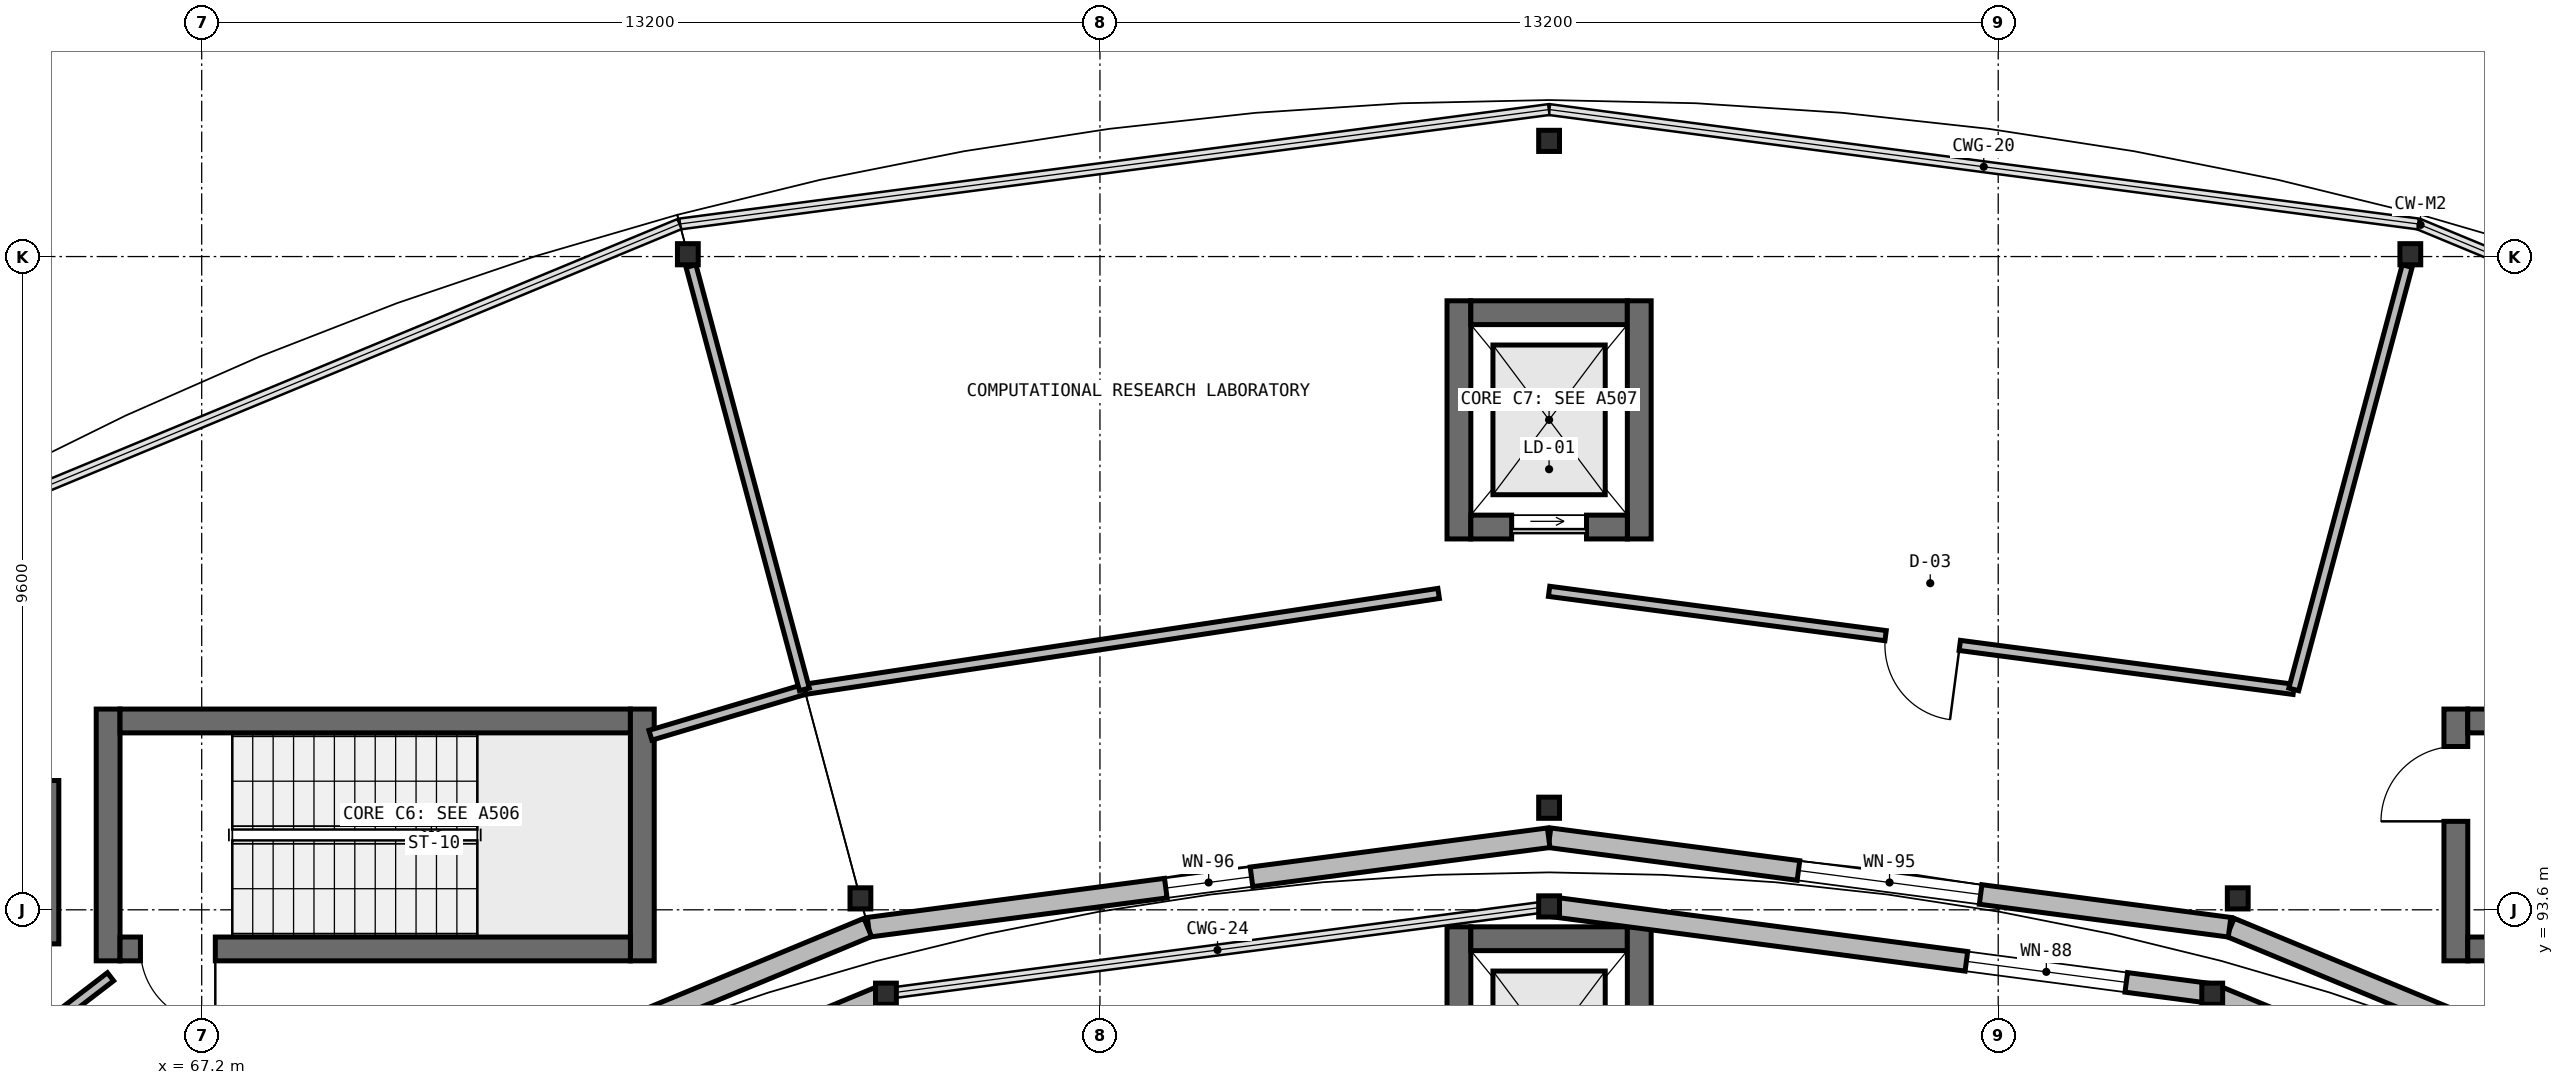
"""IFC4 building model, lengths in metres.
Left out: names, types, materials, properties, quantities, classifications, styles, units other than length and angle.
Written with IfcOpenShell. Run it as: python <this file> out.ifc"""

import sys

from ifc_helpers import new_model, si_unit, direction, frame, frame_2d, origin, origin_2d, place, context, subcontext, project, spatial, rectangle, i_section, extrude, element, fill, save


model = new_model("IFC4")
c1 = context("Model", 3, precision=1e-05, world=origin(), true_north=direction((0.0, 1.0)))
c2 = subcontext(c1, "Body", "Model", "MODEL_VIEW")
j1 = project(units=[si_unit("LENGTHUNIT", "METRE"), si_unit("PLANEANGLEUNIT", "RADIAN")], contexts=[c1])
p1 = place(None, origin())
s1 = spatial("IfcSite", under=j1, at=p1, CompositionType="ELEMENT")
p2 = place(p1, origin())
s2 = spatial("IfcBuilding", under=s1, at=p2, CompositionType="ELEMENT")
p3 = place(p2, frame((0.0, 0.0, 14.35)))
s3 = spatial("IfcBuildingStorey", under=s2, at=p3, CompositionType="ELEMENT", Elevation=14.35)
p4 = place(p3, frame((100.325, 92.85, 0.0), z_axis=(0.0, 0.0, 1.0), x_axis=(0.0, 1.0, 0.0)))
e1 = element("IfcWall", 1, at=p4, inside=s3, PredefinedType="SHEAR", context=c2, shape_type="SweptSolid", body=[
    extrude(rectangle(XDim=3.7, YDim=0.35, at=frame_2d((1.85, 0.0))), origin(), (0.0, 0.0, 1.0), 4.55),
])
p5 = place(p4, frame((2.05, 0.0, 0.0)))
e2 = element("IfcOpeningElement", 2, at=p5, cuts=e1, PredefinedType="OPENING", context=c2, shape_type="SweptSolid", body=[
    extrude(rectangle(XDim=1.1, YDim=2.15, at=frame_2d((0.55, 1.075))), frame((0.0, 0.185, 0.0), z_axis=(0.0, -1.0, 0.0), x_axis=(1.0, 0.0, 0.0)), (0.0, 0.0, 1.0), 0.37),
])
for number, where, z_axis, x_axis in (
    (3, (100.5, 96.375, 0.0), (0.0, 0.0, 1.0), (1.0, 0.0, 0.0)),
    (4, (108.0, 93.025, 0.0), (0.0, 0.0, 1.0), (-1.0, 0.0, 0.0)),
):
    element("IfcWall", number, at=place(p3, frame(where, z_axis=z_axis, x_axis=x_axis)), inside=s3, PredefinedType="SHEAR", context=c2, shape_type="SweptSolid", body=[
        extrude(rectangle(XDim=7.5, YDim=0.35, at=frame_2d((3.75, 0.0))), origin(), (0.0, 0.0, 1.0), 4.55),
    ])
p6 = place(p3, frame((65.825, 92.85, 0.0), z_axis=(0.0, 0.0, 1.0), x_axis=(0.0, 1.0, 0.0)))
e5 = element("IfcWall", 5, at=p6, inside=s3, PredefinedType="SHEAR", context=c2, shape_type="SweptSolid", body=[
    extrude(rectangle(XDim=3.7, YDim=0.35, at=frame_2d((1.85, 0.0))), origin(), (0.0, 0.0, 1.0), 4.55),
])
p7 = place(p3, frame((66.0, 96.375, 0.0), z_axis=(0.0, 0.0, 1.0), x_axis=(1.0, 0.0, 0.0)))
e6 = element("IfcWall", 6, at=p7, inside=s3, PredefinedType="SHEAR", context=c2, shape_type="SweptSolid", body=[
    extrude(rectangle(XDim=7.5, YDim=0.35, at=frame_2d((3.75, 0.0))), origin(), (0.0, 0.0, 1.0), 4.55),
])
p8 = place(p3, frame((73.675, 96.55, 0.0), z_axis=(0.0, 0.0, 1.0), x_axis=(0.0, -1.0, 0.0)))
e7 = element("IfcWall", 7, at=p8, inside=s3, PredefinedType="SHEAR", context=c2, shape_type="SweptSolid", body=[
    extrude(rectangle(XDim=3.7, YDim=0.35, at=frame_2d((1.85, 0.0))), origin(), (0.0, 0.0, 1.0), 4.55),
])
p9 = place(p3, frame((73.5, 93.025, 0.0), z_axis=(0.0, 0.0, 1.0), x_axis=(-1.0, 0.0, 0.0)))
e8 = element("IfcWall", 8, at=p9, inside=s3, PredefinedType="SHEAR", context=c2, shape_type="SweptSolid", body=[
    extrude(rectangle(XDim=7.5, YDim=0.35, at=frame_2d((3.75, 0.0))), origin(), (0.0, 0.0, 1.0), 4.55),
])
p10 = place(p9, frame((6.1, 0.0, 0.0)))
e9 = element("IfcOpeningElement", 9, at=p10, cuts=e8, PredefinedType="OPENING", context=c2, shape_type="SweptSolid", body=[
    extrude(rectangle(XDim=1.1, YDim=2.15, at=frame_2d((0.55, 1.075))), frame((0.0, 0.185, 0.0), z_axis=(0.0, -1.0, 0.0), x_axis=(1.0, 0.0, 0.0)), (0.0, 0.0, 1.0), 0.37),
])
p11 = place(p3, frame((85.675, 89.85, 0.0), z_axis=(0.0, 0.0, 1.0), x_axis=(0.0, 1.0, 0.0)))
e10 = element("IfcWall", 10, at=p11, inside=s3, PredefinedType="SHEAR", context=c2, shape_type="SweptSolid", body=[
    extrude(rectangle(XDim=3.5, YDim=0.35, at=frame_2d((1.75, 0.0))), origin(), (0.0, 0.0, 1.0), 4.55),
])
p12 = place(p3, frame((85.85, 93.175, 0.0), z_axis=(0.0, 0.0, 1.0), x_axis=(1.0, 0.0, 0.0)))
e11 = element("IfcWall", 11, at=p12, inside=s3, PredefinedType="SHEAR", context=c2, shape_type="SweptSolid", body=[
    extrude(rectangle(XDim=2.3, YDim=0.35, at=frame_2d((1.15, 0.0))), origin(), (0.0, 0.0, 1.0), 4.55),
])
for number, where, z_axis, x_axis in (
    (12, (88.325, 93.35, 0.0), (0.0, 0.0, 1.0), (0.0, -1.0, 0.0)),
    (13, (85.675, 99.05, 0.0), (0.0, 0.0, 1.0), (0.0, 1.0, 0.0)),
):
    element("IfcWall", number, at=place(p3, frame(where, z_axis=z_axis, x_axis=x_axis)), inside=s3, PredefinedType="SHEAR", context=c2, shape_type="SweptSolid", body=[
        extrude(rectangle(XDim=3.5, YDim=0.35, at=frame_2d((1.75, 0.0))), origin(), (0.0, 0.0, 1.0), 4.55),
    ])
p13 = place(p3, frame((85.85, 102.375, 0.0), z_axis=(0.0, 0.0, 1.0), x_axis=(1.0, 0.0, 0.0)))
e14 = element("IfcWall", 14, at=p13, inside=s3, PredefinedType="SHEAR", context=c2, shape_type="SweptSolid", body=[
    extrude(rectangle(XDim=2.3, YDim=0.35, at=frame_2d((1.15, 0.0))), origin(), (0.0, 0.0, 1.0), 4.55),
])
p14 = place(p3, frame((88.325, 102.55, 0.0), z_axis=(0.0, 0.0, 1.0), x_axis=(0.0, -1.0, 0.0)))
e15 = element("IfcWall", 15, at=p14, inside=s3, PredefinedType="SHEAR", context=c2, shape_type="SweptSolid", body=[
    extrude(rectangle(XDim=3.5, YDim=0.35, at=frame_2d((1.75, 0.0))), origin(), (0.0, 0.0, 1.0), 4.55),
])
p15 = place(p3, frame((88.15, 99.225, 0.0), z_axis=(0.0, 0.0, 1.0), x_axis=(-1.0, 0.0, 0.0)))
e16 = element("IfcWall", 16, at=p15, inside=s3, PredefinedType="SHEAR", context=c2, shape_type="SweptSolid", body=[
    extrude(rectangle(XDim=2.3, YDim=0.35, at=frame_2d((1.15, 0.0))), origin(), (0.0, 0.0, 1.0), 4.55),
])
p16 = place(p15, frame((0.6, 0.0, 0.0)))
e17 = element("IfcOpeningElement", 17, at=p16, cuts=e16, PredefinedType="OPENING", context=c2, shape_type="SweptSolid", body=[
    extrude(rectangle(XDim=1.1, YDim=2.15, at=frame_2d((0.55, 1.075))), frame((0.0, 0.185, 0.0), z_axis=(0.0, -1.0, 0.0), x_axis=(1.0, 0.0, 0.0)), (0.0, 0.0, 1.0), 0.37),
])
for number, where, z_axis, x_axis in (
    (18, (97.12, 93.768, 0.0), (0.0, 0.0, 1.0), (1.0, 0.0, 0.0)),
    (19, (99.656, 103.234, 0.0), (0.0, 0.0, 1.0), (1.0, 0.0, 0.0)),
    (20, (87.0, 95.1, 0.0), (0.0, 0.0, 1.0), (1.0, 0.0, 0.0)),
    (21, (87.0, 104.9, 0.0), (0.0, 0.0, 1.0), (1.0, 0.0, 0.0)),
    (22, (76.88, 93.768, 0.0), (0.0, 0.0, 1.0), (1.0, 0.0, 0.0)),
    (23, (74.344, 103.234, 0.0), (0.0, 0.0, 1.0), (1.0, 0.0, 0.0)),
    (24, (96.745, 92.367, 0.0), (0.0, 0.0, 1.0), (1.0, 0.0, 0.0)),
    (25, (87.0, 93.65, 0.0), (0.0, 0.0, 1.0), (1.0, 0.0, 0.0)),
    (26, (77.255, 92.367, 0.0), (0.0, 0.0, 1.0), (1.0, 0.0, 0.0)),
):
    element("IfcColumn", number, at=place(p3, frame(where, z_axis=z_axis, x_axis=x_axis)), inside=s3, PredefinedType="COLUMN", context=c2, shape_type="SweptSolid", body=[
        extrude(i_section(OverallWidth=0.306, OverallDepth=0.311, WebThickness=0.011, FlangeThickness=0.017, at=origin_2d()), origin(), (0.0, 0.0, 1.0), 4.55),
    ])
p17 = place(p3, frame((64.95, 95.5, 0.0), z_axis=(0.0, 0.0, 1.0), x_axis=(0.0, -1.0, 0.0)))
e27 = element("IfcWall", 27, at=p17, inside=s3, PredefinedType="SHEAR", context=c2, shape_type="SweptSolid", body=[
    extrude(rectangle(XDim=2.4, YDim=0.3, at=frame_2d((1.2, 0.0))), origin(), (0.0, 0.0, 1.0), 4.37),
])
p18 = place(p3, frame((106.325, 89.483, 0.0), z_axis=(0.0, 0.0, 1.0), x_axis=(-0.92385889973, 0.382733240508, 0.0)))
e28 = element("IfcWall", 28, at=p18, inside=s3, PredefinedType="SOLIDWALL", context=c2, shape_type="SweptSolid", body=[
    extrude(rectangle(XDim=10.081, YDim=0.29, at=frame_2d((5.04, 0.0))), origin(), (0.0, 0.0, 1.0), 4.37),
])
p19 = place(p18, frame((3.855, 0.0, 0.95)))
e29 = element("IfcOpeningElement", 29, at=p19, cuts=e28, PredefinedType="OPENING", context=c2, shape_type="SweptSolid", body=[
    extrude(rectangle(XDim=2.37, YDim=1.59, at=frame_2d((1.185, 0.795))), frame((0.0, 0.155, 0.0), z_axis=(0.0, -1.0, 0.0), x_axis=(1.0, 0.0, 0.0)), (0.0, 0.0, 1.0), 0.31),
])
p20 = place(p3, frame((97.0, 93.344, 0.0), z_axis=(0.0, 0.0, 1.0), x_axis=(-0.991454872597, 0.130450126879, 0.0)))
e30 = element("IfcWall", 30, at=p20, inside=s3, PredefinedType="SOLIDWALL", context=c2, shape_type="SweptSolid", body=[
    extrude(rectangle(XDim=10.08, YDim=0.29, at=frame_2d((5.04, 0.0))), origin(), (0.0, 0.0, 1.0), 3.734),
])
p21 = place(p20, frame((3.69, 0.0, 0.95)))
e31 = element("IfcOpeningElement", 31, at=p21, cuts=e30, PredefinedType="OPENING", context=c2, shape_type="SweptSolid", body=[
    extrude(rectangle(XDim=2.7, YDim=1.51, at=frame_2d((1.35, 0.755))), frame((0.0, 0.155, 0.0), z_axis=(0.0, -1.0, 0.0), x_axis=(1.0, 0.0, 0.0)), (0.0, 0.0, 1.0), 0.31),
])
p22 = place(p3, frame((86.994, 94.659, 0.0), z_axis=(0.0, 0.0, 1.0), x_axis=(-0.991454872597, -0.130450126879, 0.0)))
e32 = element("IfcWall", 32, at=p22, inside=s3, PredefinedType="SOLIDWALL", context=c2, shape_type="SweptSolid", body=[
    extrude(rectangle(XDim=10.08, YDim=0.29, at=frame_2d((5.04, 0.0))), origin(), (0.0, 0.0, 1.0), 3.734),
])
p23 = place(p22, frame((4.405, 0.0, 0.95)))
e33 = element("IfcOpeningElement", 33, at=p23, cuts=e32, PredefinedType="OPENING", context=c2, shape_type="SweptSolid", body=[
    extrude(rectangle(XDim=1.27, YDim=1.43, at=frame_2d((0.635, 0.715))), frame((0.0, 0.155, 0.0), z_axis=(0.0, -1.0, 0.0), x_axis=(1.0, 0.0, 0.0)), (0.0, 0.0, 1.0), 0.31),
])
p24 = place(p3, frame((76.988, 93.341, 0.0), z_axis=(0.0, 0.0, 1.0), x_axis=(-0.92385889973, -0.382733240508, 0.0)))
e34 = element("IfcWall", 34, at=p24, inside=s3, PredefinedType="SOLIDWALL", context=c2, shape_type="SweptSolid", body=[
    extrude(rectangle(XDim=10.081, YDim=0.29, at=frame_2d((5.04, 0.0))), origin(), (0.0, 0.0, 1.0), 4.37),
])
p25 = place(p24, frame((4.24, 0.0, 0.95)))
e35 = element("IfcOpeningElement", 35, at=p25, cuts=e34, PredefinedType="OPENING", context=c2, shape_type="SweptSolid", body=[
    extrude(rectangle(XDim=1.6, YDim=1.35, at=frame_2d((0.8, 0.675))), frame((0.0, 0.155, 0.0), z_axis=(0.0, -1.0, 0.0), x_axis=(1.0, 0.0, 0.0)), (0.0, 0.0, 1.0), 0.31),
])
p26 = place(p3, frame((96.748, 92.366, 0.0), z_axis=(0.0, 0.0, 1.0), x_axis=(0.923848052238, -0.382759423628, 0.0)))
e36 = element("IfcWall", 36, at=p26, inside=s3, PredefinedType="SOLIDWALL", context=c2, shape_type="SweptSolid", body=[
    extrude(rectangle(XDim=9.821, YDim=0.29, at=frame_2d((4.91, 0.0))), origin(), (0.0, 0.0, 1.0), 4.37),
])
p27 = place(p26, frame((1.6, 0.0, 0.95)))
e37 = element("IfcOpeningElement", 37, at=p27, cuts=e36, PredefinedType="OPENING", context=c2, shape_type="SweptSolid", body=[
    extrude(rectangle(XDim=1.71, YDim=1.8, at=frame_2d((0.855, 0.9))), frame((0.0, 0.155, 0.0), z_axis=(0.0, -1.0, 0.0), x_axis=(1.0, 0.0, 0.0)), (0.0, 0.0, 1.0), 0.31),
])
p28 = place(p26, frame((6.511, 0.0, 0.95)))
e38 = element("IfcOpeningElement", 38, at=p28, cuts=e36, PredefinedType="OPENING", context=c2, shape_type="SweptSolid", body=[
    extrude(rectangle(XDim=1.71, YDim=1.8, at=frame_2d((0.855, 0.9))), frame((0.0, 0.155, 0.0), z_axis=(0.0, -1.0, 0.0), x_axis=(1.0, 0.0, 0.0)), (0.0, 0.0, 1.0), 0.31),
])
p29 = place(p3, frame((87.004, 93.649, 0.0), z_axis=(0.0, 0.0, 1.0), x_axis=(0.991456749128, -0.130435863969, 0.0)))
e39 = element("IfcWall", 39, at=p29, inside=s3, PredefinedType="SOLIDWALL", context=c2, shape_type="SweptSolid", body=[
    extrude(rectangle(XDim=9.821, YDim=0.29, at=frame_2d((4.911, 0.0))), origin(), (0.0, 0.0, 1.0), 3.816),
])
p30 = place(p29, frame((6.181, 0.0, 0.95)))
e40 = element("IfcOpeningElement", 40, at=p30, cuts=e39, PredefinedType="OPENING", context=c2, shape_type="SweptSolid", body=[
    extrude(rectangle(XDim=2.37, YDim=1.64, at=frame_2d((1.185, 0.82))), frame((0.0, 0.155, 0.0), z_axis=(0.0, -1.0, 0.0), x_axis=(1.0, 0.0, 0.0)), (0.0, 0.0, 1.0), 0.31),
])
p31 = place(p3, frame((68.179, 88.607, 0.0), z_axis=(0.0, 0.0, 1.0), x_axis=(0.923848052238, 0.382759423628, 0.0)))
e41 = element("IfcWall", 41, at=p31, inside=s3, PredefinedType="SOLIDWALL", context=c2, shape_type="SweptSolid", body=[
    extrude(rectangle(XDim=9.821, YDim=0.29, at=frame_2d((4.91, 0.0))), origin(), (0.0, 0.0, 1.0), 4.37),
])
p32 = place(p31, frame((1.105, 0.0, 0.95)))
e42 = element("IfcOpeningElement", 42, at=p32, cuts=e41, PredefinedType="OPENING", context=c2, shape_type="SweptSolid", body=[
    extrude(rectangle(XDim=2.7, YDim=1.56, at=frame_2d((1.35, 0.78))), frame((0.0, 0.155, 0.0), z_axis=(0.0, -1.0, 0.0), x_axis=(1.0, 0.0, 0.0)), (0.0, 0.0, 1.0), 0.31),
])
p33 = place(p31, frame((6.016, 0.0, 0.95)))
e43 = element("IfcOpeningElement", 43, at=p33, cuts=e41, PredefinedType="OPENING", context=c2, shape_type="SweptSolid", body=[
    extrude(rectangle(XDim=2.7, YDim=1.56, at=frame_2d((1.35, 0.78))), frame((0.0, 0.155, 0.0), z_axis=(0.0, -1.0, 0.0), x_axis=(1.0, 0.0, 0.0)), (0.0, 0.0, 1.0), 0.31),
])
p34 = place(p3, frame((97.943, 96.839, 0.0), z_axis=(0.0, 0.0, 1.0), x_axis=(-0.991442170204, 0.130546632054, 0.0)))
e44 = element("IfcWall", 44, at=p34, inside=s3, PredefinedType="PARTITIONING", context=c2, shape_type="SweptSolid", body=[
    extrude(rectangle(XDim=11.038, YDim=0.15, at=frame_2d((5.519, 0.0))), origin(), (0.0, 0.0, 1.0), 3.738),
])
p35 = place(p34, frame((4.95, 0.0, 0.0)))
e45 = element("IfcOpeningElement", 45, at=p35, cuts=e44, PredefinedType="OPENING", context=c2, shape_type="SweptSolid", body=[
    extrude(rectangle(XDim=1.1, YDim=2.2, at=frame_2d((0.55, 1.1))), frame((0.0, 0.085, 0.0), z_axis=(0.0, -1.0, 0.0), x_axis=(1.0, 0.0, 0.0)), (0.0, 0.0, 1.0), 0.17),
])
p36 = place(p3, frame((85.377, 98.249, 0.0), z_axis=(0.0, 0.0, 1.0), x_axis=(-0.988750352389, -0.149575200656, 0.0)))
e46 = element("IfcWall", 46, at=p36, inside=s3, PredefinedType="PARTITIONING", context=c2, shape_type="SweptSolid", body=[
    extrude(rectangle(XDim=9.426, YDim=0.15, at=frame_2d((4.713, 0.0))), origin(), (0.0, 0.0, 1.0), 3.738),
])
p37 = place(p3, frame((76.057, 96.839, 0.0), z_axis=(0.0, 0.0, 1.0), x_axis=(-0.95838508169, -0.285478607244, 0.0)))
e47 = element("IfcWall", 47, at=p37, inside=s3, PredefinedType="PARTITIONING", context=c2, shape_type="SweptSolid", body=[
    extrude(rectangle(XDim=2.361, YDim=0.15, at=frame_2d((1.181, 0.0))), origin(), (0.0, 0.0, 1.0), 3.738),
])
p38 = place(p3, frame((65.86, 92.616, 0.0), z_axis=(0.0, 0.0, 1.0), x_axis=(-0.793301872689, -0.608828497024, 0.0)))
e48 = element("IfcWall", 48, at=p38, inside=s3, PredefinedType="PARTITIONING", context=c2, shape_type="SweptSolid", body=[
    extrude(rectangle(XDim=11.038, YDim=0.15, at=frame_2d((5.519, 0.0))), origin(), (0.0, 0.0, 1.0), 3.738),
])
p39 = place(p38, frame((4.95, 0.0, 0.0)))
e49 = element("IfcOpeningElement", 49, at=p39, cuts=e48, PredefinedType="OPENING", context=c2, shape_type="SweptSolid", body=[
    extrude(rectangle(XDim=1.1, YDim=2.2, at=frame_2d((0.55, 1.1))), frame((0.0, 0.085, 0.0), z_axis=(0.0, -1.0, 0.0), x_axis=(1.0, 0.0, 0.0)), (0.0, 0.0, 1.0), 0.17),
])
for number, where, z_axis, x_axis in (
    (50, (97.943, 96.839, 0.0), (0.0, 0.0, 1.0), (0.259, 0.966, 0.0)),
    (51, (76.057, 96.839, 0.0), (0.0, 0.0, 1.0), (-0.259, 0.966, 0.0)),
):
    element("IfcWall", number, at=place(p3, frame(where, z_axis=z_axis, x_axis=x_axis)), inside=s3, PredefinedType="PARTITIONING", context=c2, shape_type="SweptSolid", body=[
        extrude(rectangle(XDim=6.44, YDim=0.15, at=frame_2d((3.22, 0.0))), origin(), (0.0, 0.0, 1.0), 3.738),
    ])
p40 = place(p21, origin())
e52 = element("IfcWindow", 52, at=p40, inside=s3, PartitioningType="SINGLE_PANEL", PredefinedType="WINDOW", context=c2, shape_type="SweptSolid", body=[
    extrude(rectangle(XDim=2.7, YDim=1.51, at=frame_2d((1.35, 0.755))), frame((0.0, 0.03, 0.0), z_axis=(0.0, -1.0, 0.0), x_axis=(1.0, 0.0, 0.0)), (0.0, 0.0, 1.0), 0.06),
])
fill(e31, e52)
p41 = place(p23, origin())
e53 = element("IfcWindow", 53, at=p41, inside=s3, PartitioningType="SINGLE_PANEL", PredefinedType="WINDOW", context=c2, shape_type="SweptSolid", body=[
    extrude(rectangle(XDim=1.27, YDim=1.43, at=frame_2d((0.635, 0.715))), frame((0.0, 0.03, 0.0), z_axis=(0.0, -1.0, 0.0), x_axis=(1.0, 0.0, 0.0)), (0.0, 0.0, 1.0), 0.06),
])
fill(e33, e53)
p42 = place(p30, origin())
e54 = element("IfcWindow", 54, at=p42, inside=s3, PartitioningType="SINGLE_PANEL", PredefinedType="WINDOW", context=c2, shape_type="SweptSolid", body=[
    extrude(rectangle(XDim=2.37, YDim=1.64, at=frame_2d((1.185, 0.82))), frame((0.0, 0.03, 0.0), z_axis=(0.0, -1.0, 0.0), x_axis=(1.0, 0.0, 0.0)), (0.0, 0.0, 1.0), 0.06),
])
fill(e40, e54)
p43 = place(p5, origin())
e55 = element("IfcDoor", 55, at=p43, inside=s3, OperationType="SINGLE_SWING_LEFT", PredefinedType="DOOR", context=c2, shape_type="SweptSolid", body=[
    extrude(rectangle(XDim=1.1, YDim=2.15, at=frame_2d((0.55, 1.075))), frame((0.0, 0.025, 0.0), z_axis=(0.0, -1.0, 0.0), x_axis=(1.0, 0.0, 0.0)), (0.0, 0.0, 1.0), 0.05),
])
fill(e2, e55)
p44 = place(p10, origin())
e56 = element("IfcDoor", 56, at=p44, inside=s3, OperationType="SINGLE_SWING_LEFT", PredefinedType="DOOR", context=c2, shape_type="SweptSolid", body=[
    extrude(rectangle(XDim=1.1, YDim=2.15, at=frame_2d((0.55, 1.075))), frame((0.0, 0.025, 0.0), z_axis=(0.0, -1.0, 0.0), x_axis=(1.0, 0.0, 0.0)), (0.0, 0.0, 1.0), 0.05),
])
fill(e9, e56)
p45 = place(p16, origin())
e57 = element("IfcDoor", 57, at=p45, inside=s3, OperationType="SLIDING_TO_LEFT", PredefinedType="USERDEFINED", context=c2, shape_type="SweptSolid", body=[
    extrude(rectangle(XDim=1.1, YDim=2.15, at=frame_2d((0.55, 1.075))), frame((0.0, 0.025, 0.0), z_axis=(0.0, -1.0, 0.0), x_axis=(1.0, 0.0, 0.0)), (0.0, 0.0, 1.0), 0.05),
])
fill(e17, e57)
p46 = place(p35, origin())
e58 = element("IfcDoor", 58, at=p46, inside=s3, OperationType="SINGLE_SWING_LEFT", PredefinedType="DOOR", context=c2, shape_type="SweptSolid", body=[
    extrude(rectangle(XDim=1.1, YDim=2.2, at=frame_2d((0.55, 1.1))), frame((0.0, 0.025, 0.0), z_axis=(0.0, -1.0, 0.0), x_axis=(1.0, 0.0, 0.0)), (0.0, 0.0, 1.0), 0.05),
])
fill(e45, e58)
save(model, sys.argv[1])
